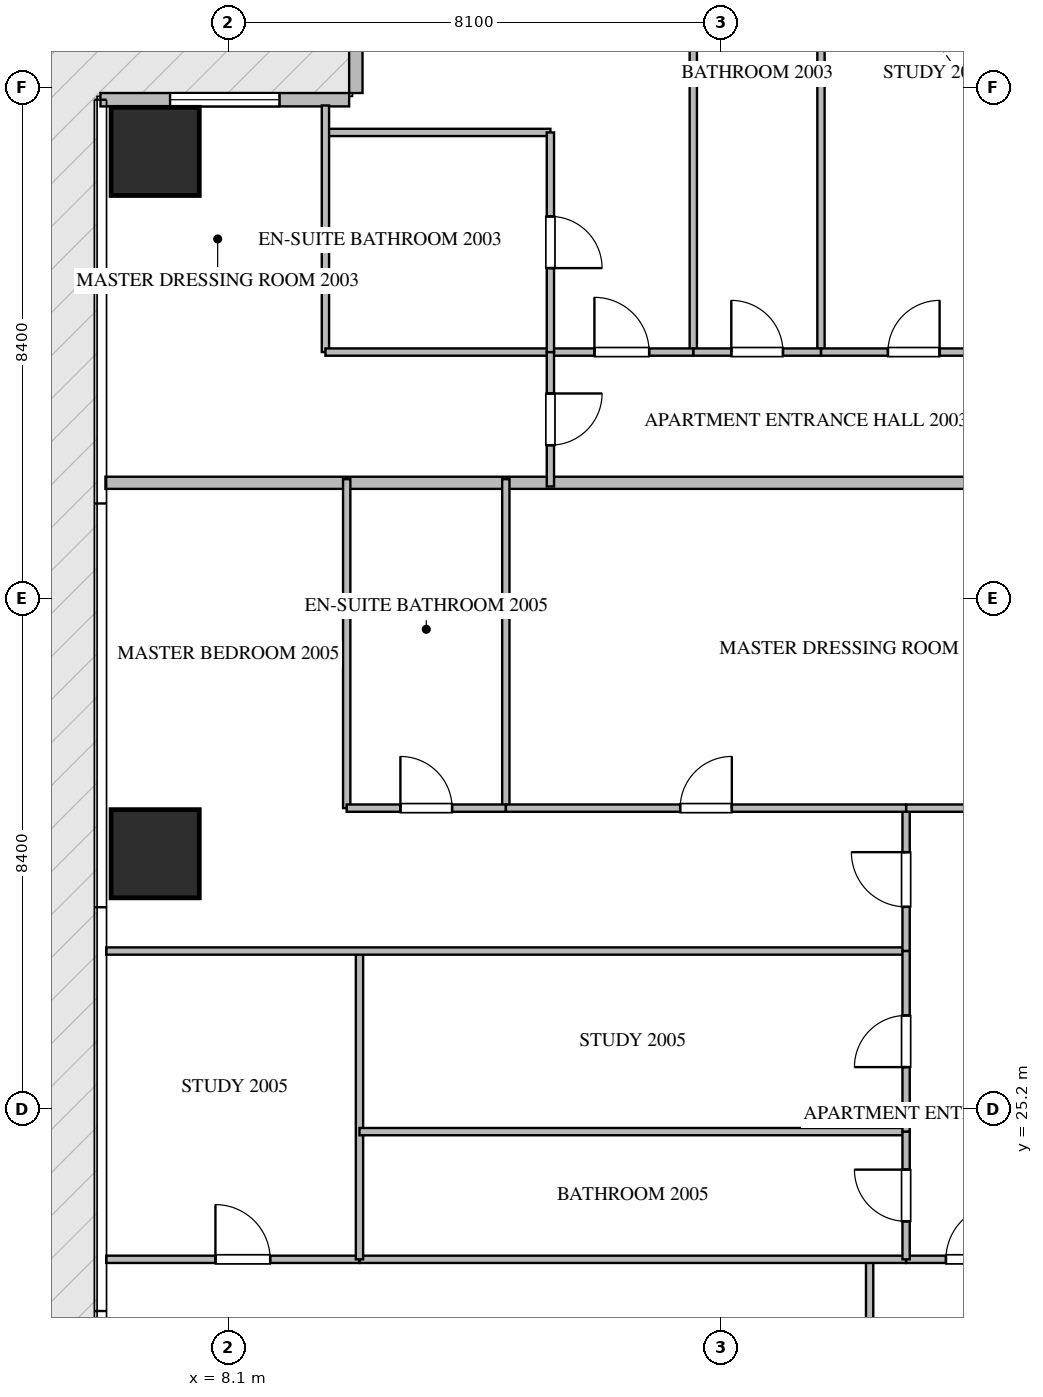
"""IFC4 building model, lengths in metres.
Left out: names, types, materials, properties, quantities, classifications, styles, units other than length and angle.
Written with IfcOpenShell. Run it as: python <this file> out.ifc"""

import sys

from ifc_helpers import new_model, si_unit, direction, frame, frame_2d, origin, origin_2d, place, context, subcontext, project, spatial, rectangle, extrude, source, transform, mapped, element, fill, save


model = new_model("IFC4")
c1 = context("Model", 3, precision=1e-05, world=origin(), true_north=direction((0.0, 1.0)))
c2 = subcontext(c1, "Body", "Model", "MODEL_VIEW")
j1 = project(units=[si_unit("LENGTHUNIT", "METRE"), si_unit("PLANEANGLEUNIT", "RADIAN")], contexts=[c1])
p1 = place(None, origin())
s1 = spatial("IfcSite", under=j1, at=p1, CompositionType="ELEMENT")
p2 = place(p1, origin())
s2 = spatial("IfcBuilding", under=s1, at=p2, CompositionType="ELEMENT")
p3 = place(p2, frame((0.0, 0.0, 82.95)))
s3 = spatial("IfcBuildingStorey", under=s2, at=p3, CompositionType="ELEMENT", Elevation=82.95)
m1 = source(origin(), c2, "Body", "SweptSolid", [
    extrude(rectangle(XDim=1.45, YDim=1.45, at=origin_2d()), origin(), (0.0, 0.0, 1.0), 3.75),
])
for number, where, z_axis, x_axis in (
    (1, (6.9, 29.4, -0.26), (0.0, 0.0, 1.0), (1.0, 0.0, 0.0)),
    (2, (6.9, 40.95, -0.26), (0.0, 0.0, 1.0), (1.0, 0.0, 0.0)),
):
    element("IfcColumn", number, at=place(p3, frame(where, z_axis=z_axis, x_axis=x_axis)), inside=s3, PredefinedType="COLUMN", context=c2, shape_type="MappedRepresentation", body=[
        mapped(m1, transform((0.0, 0.0, 0.0), scale=1.0)),
    ])
p4 = place(p3, frame((10.2, 45.89, 0.0), z_axis=(0.0, 0.0, 1.0), x_axis=(0.0, -1.0, 0.0)))
e3 = element("IfcWall", 3, at=p4, inside=s3, PredefinedType="ELEMENTEDWALL", context=c2, shape_type="SweptSolid", body=[
    extrude(rectangle(XDim=3.98, YDim=0.22, at=frame_2d((1.99, 0.0))), origin(), (0.0, 0.0, 1.0), 3.475),
])
p5 = place(p4, frame((1.09, 0.0, 0.65)))
e4 = element("IfcOpeningElement", 4, at=p5, cuts=e3, PredefinedType="OPENING", context=c2, shape_type="SweptSolid", body=[
    extrude(rectangle(XDim=1.8, YDim=2.1, at=frame_2d((0.9, 1.05))), frame((0.0, 0.12, 0.0), z_axis=(0.0, -1.0, 0.0), x_axis=(1.0, 0.0, 0.0)), (0.0, 0.0, 1.0), 0.24),
])
p6 = place(p3, frame((10.09, 41.8, 0.0), z_axis=(0.0, 0.0, 1.0), x_axis=(-1.0, 0.0, 0.0)))
e5 = element("IfcWall", 5, at=p6, inside=s3, PredefinedType="ELEMENTEDWALL", context=c2, shape_type="SweptSolid", body=[
    extrude(rectangle(XDim=4.09, YDim=0.22, at=frame_2d((2.045, 0.0))), origin(), (0.0, 0.0, 1.0), 3.475),
])
p7 = place(p6, frame((1.145, 0.0, 0.65)))
e6 = element("IfcOpeningElement", 6, at=p7, cuts=e5, PredefinedType="OPENING", context=c2, shape_type="SweptSolid", body=[
    extrude(rectangle(XDim=1.8, YDim=2.1, at=frame_2d((0.9, 1.05))), frame((0.0, 0.12, 0.0), z_axis=(0.0, -1.0, 0.0), x_axis=(1.0, 0.0, 0.0)), (0.0, 0.0, 1.0), 0.24),
])
p8 = place(p3, frame((6.082, 35.5, 0.0), z_axis=(0.0, 0.0, 1.0), x_axis=(1.0, 0.0, 0.0)))
e7 = element("IfcWall", 7, at=p8, inside=s3, PredefinedType="PARTITIONING", context=c2, shape_type="SweptSolid", body=[
    extrude(rectangle(XDim=15.318, YDim=0.2, at=frame_2d((7.659, 0.0))), origin(), (0.0, 0.0, 1.0), 3.49),
])
p9 = place(p3, frame((15.75, 50.105, 0.0), z_axis=(0.0, 0.0, 1.0), x_axis=(0.0, -1.0, 0.0)))
e8 = element("IfcWall", 8, at=p9, inside=s3, PredefinedType="PARTITIONING", context=c2, shape_type="SweptSolid", body=[
    extrude(rectangle(XDim=12.455, YDim=0.12, at=frame_2d((6.228, 0.0))), origin(), (0.0, 0.0, 1.0), 3.49),
])
p10 = place(p3, frame((17.85, 46.279, 0.0), z_axis=(0.0, 0.0, 1.0), x_axis=(0.0, -1.0, 0.0)))
e9 = element("IfcWall", 9, at=p10, inside=s3, PredefinedType="PARTITIONING", context=c2, shape_type="SweptSolid", body=[
    extrude(rectangle(XDim=8.629, YDim=0.12, at=frame_2d((4.314, 0.0))), origin(), (0.0, 0.0, 1.0), 3.49),
])
p11 = place(p3, frame((15.75, 37.65, 0.0), z_axis=(0.0, 0.0, 1.0), x_axis=(1.0, 0.0, 0.0)))
e10 = element("IfcWall", 10, at=p11, inside=s3, PredefinedType="PARTITIONING", context=c2, shape_type="SweptSolid", body=[
    extrude(rectangle(XDim=2.1, YDim=0.12, at=frame_2d((1.05, 0.0))), origin(), (0.0, 0.0, 1.0), 3.49),
])
p12 = place(p11, frame((0.625, 0.0, 0.0)))
e11 = element("IfcOpeningElement", 11, at=p12, cuts=e10, PredefinedType="OPENING", context=c2, shape_type="SweptSolid", body=[
    extrude(rectangle(XDim=0.85, YDim=2.1, at=frame_2d((0.425, 1.05))), frame((0.0, 0.07, 0.0), z_axis=(0.0, -1.0, 0.0), x_axis=(1.0, 0.0, 0.0)), (0.0, 0.0, 1.0), 0.14),
])
p13 = place(p3, frame((17.852, 37.65, 0.0), z_axis=(0.0, 0.0, 1.0), x_axis=(1.0, 0.0, 0.0)))
e12 = element("IfcWall", 12, at=p13, inside=s3, PredefinedType="PARTITIONING", context=c2, shape_type="SweptSolid", body=[
    extrude(rectangle(XDim=3.048, YDim=0.12, at=frame_2d((1.524, 0.0))), origin(), (0.0, 0.0, 1.0), 3.49),
])
p14 = place(p13, frame((1.099, 0.0, 0.0)))
e13 = element("IfcOpeningElement", 13, at=p14, cuts=e12, PredefinedType="OPENING", context=c2, shape_type="SweptSolid", body=[
    extrude(rectangle(XDim=0.85, YDim=2.1, at=frame_2d((0.425, 1.05))), frame((0.0, 0.07, 0.0), z_axis=(0.0, -1.0, 0.0), x_axis=(1.0, 0.0, 0.0)), (0.0, 0.0, 1.0), 0.14),
])
p15 = place(p3, frame((13.4, 37.65, 0.0), z_axis=(0.0, 0.0, 1.0), x_axis=(1.0, 0.0, 0.0)))
e14 = element("IfcWall", 14, at=p15, inside=s3, PredefinedType="PARTITIONING", context=c2, shape_type="SweptSolid", body=[
    extrude(rectangle(XDim=2.348, YDim=0.12, at=frame_2d((1.174, 0.0))), origin(), (0.0, 0.0, 1.0), 3.49),
])
p16 = place(p15, frame((0.724, 0.0, 0.0)))
e15 = element("IfcOpeningElement", 15, at=p16, cuts=e14, PredefinedType="OPENING", context=c2, shape_type="SweptSolid", body=[
    extrude(rectangle(XDim=0.9, YDim=2.1, at=frame_2d((0.45, 1.05))), frame((0.0, 0.07, 0.0), z_axis=(0.0, -1.0, 0.0), x_axis=(1.0, 0.0, 0.0)), (0.0, 0.0, 1.0), 0.14),
])
p17 = place(p3, frame((9.7, 41.262, 0.0), z_axis=(0.0, 0.0, 1.0), x_axis=(1.0, 0.0, 0.0)))
e16 = element("IfcWall", 16, at=p17, inside=s3, PredefinedType="PARTITIONING", context=c2, shape_type="SweptSolid", body=[
    extrude(rectangle(XDim=3.7, YDim=0.12, at=frame_2d((1.85, 0.0))), origin(), (0.0, 0.0, 1.0), 3.49),
])
p18 = place(p3, frame((9.7, 41.705, 0.0), z_axis=(0.0, 0.0, 1.0), x_axis=(0.0, -1.0, 0.0)))
e17 = element("IfcWall", 17, at=p18, inside=s3, PredefinedType="PARTITIONING", context=c2, shape_type="SweptSolid", body=[
    extrude(rectangle(XDim=4.055, YDim=0.12, at=frame_2d((2.028, 0.0))), origin(), (0.0, 0.0, 1.0), 3.49),
])
p19 = place(p3, frame((9.7, 37.65, 0.0), z_axis=(0.0, 0.0, 1.0), x_axis=(1.0, 0.0, 0.0)))
e18 = element("IfcWall", 18, at=p19, inside=s3, PredefinedType="PARTITIONING", context=c2, shape_type="SweptSolid", body=[
    extrude(rectangle(XDim=3.698, YDim=0.12, at=frame_2d((1.849, 0.0))), origin(), (0.0, 0.0, 1.0), 3.49),
])
p20 = place(p3, frame((13.4, 41.262, 0.0), z_axis=(0.0, 0.0, 1.0), x_axis=(0.0, -1.0, 0.0)))
e19 = element("IfcWall", 19, at=p20, inside=s3, PredefinedType="PARTITIONING", context=c2, shape_type="SweptSolid", body=[
    extrude(rectangle(XDim=3.612, YDim=0.12, at=frame_2d((1.806, 0.0))), origin(), (0.0, 0.0, 1.0), 3.49),
])
p21 = place(p20, frame((1.381, 0.0, 0.0)))
e20 = element("IfcOpeningElement", 20, at=p21, cuts=e19, PredefinedType="OPENING", context=c2, shape_type="SweptSolid", body=[
    extrude(rectangle(XDim=0.85, YDim=2.1, at=frame_2d((0.425, 1.05))), frame((0.0, 0.07, 0.0), z_axis=(0.0, -1.0, 0.0), x_axis=(1.0, 0.0, 0.0)), (0.0, 0.0, 1.0), 0.14),
])
p22 = place(p3, frame((13.4, 37.648, 0.0), z_axis=(0.0, 0.0, 1.0), x_axis=(0.0, -1.0, 0.0)))
e21 = element("IfcWall", 21, at=p22, inside=s3, PredefinedType="PARTITIONING", context=c2, shape_type="SweptSolid", body=[
    extrude(rectangle(XDim=2.208, YDim=0.12, at=frame_2d((1.104, 0.0))), origin(), (0.0, 0.0, 1.0), 3.49),
])
p23 = place(p22, frame((0.679, 0.0, 0.0)))
e22 = element("IfcOpeningElement", 22, at=p23, cuts=e21, PredefinedType="OPENING", context=c2, shape_type="SweptSolid", body=[
    extrude(rectangle(XDim=0.85, YDim=2.1, at=frame_2d((0.425, 1.05))), frame((0.0, 0.07, 0.0), z_axis=(0.0, -1.0, 0.0), x_axis=(1.0, 0.0, 0.0)), (0.0, 0.0, 1.0), 0.14),
])
p24 = place(p3, frame((18.65, 19.4, 0.0), z_axis=(0.0, 0.0, 1.0), x_axis=(0.0, 1.0, 0.0)))
e23 = element("IfcWall", 23, at=p24, inside=s3, PredefinedType="PARTITIONING", context=c2, shape_type="SweptSolid", body=[
    extrude(rectangle(XDim=3.33, YDim=0.12, at=frame_2d((1.665, 0.0))), origin(), (0.0, 0.0, 1.0), 3.49),
])
p25 = place(p24, frame((1.24, 0.0, 0.0)))
e24 = element("IfcOpeningElement", 24, at=p25, cuts=e23, PredefinedType="OPENING", context=c2, shape_type="SweptSolid", body=[
    extrude(rectangle(XDim=0.85, YDim=2.1, at=frame_2d((0.425, 1.05))), frame((0.0, 0.07, 0.0), z_axis=(0.0, -1.0, 0.0), x_axis=(1.0, 0.0, 0.0)), (0.0, 0.0, 1.0), 0.14),
])
p26 = place(p3, frame((19.25, 22.73, 0.0), z_axis=(0.0, 0.0, 1.0), x_axis=(1.0, 0.0, 0.0)))
e25 = element("IfcWall", 25, at=p26, inside=s3, PredefinedType="PARTITIONING", context=c2, shape_type="SweptSolid", body=[
    extrude(rectangle(XDim=2.21, YDim=0.12, at=frame_2d((1.105, 0.0))), origin(), (0.0, 0.0, 1.0), 3.49),
])
p27 = place(p26, frame((0.655, 0.0, 0.0)))
e26 = element("IfcOpeningElement", 26, at=p27, cuts=e25, PredefinedType="OPENING", context=c2, shape_type="SweptSolid", body=[
    extrude(rectangle(XDim=0.9, YDim=2.1, at=frame_2d((0.45, 1.05))), frame((0.0, 0.07, 0.0), z_axis=(0.0, -1.0, 0.0), x_axis=(1.0, 0.0, 0.0)), (0.0, 0.0, 1.0), 0.14),
])
p28 = place(p3, frame((6.095, 22.73, 0.0), z_axis=(0.0, 0.0, 1.0), x_axis=(1.0, 0.0, 0.0)))
e27 = element("IfcWall", 27, at=p28, inside=s3, PredefinedType="PARTITIONING", context=c2, shape_type="SweptSolid", body=[
    extrude(rectangle(XDim=4.165, YDim=0.12, at=frame_2d((2.083, 0.0))), origin(), (0.0, 0.0, 1.0), 3.49),
])
p29 = place(p28, frame((1.796, 0.0, 0.0)))
e28 = element("IfcOpeningElement", 28, at=p29, cuts=e27, PredefinedType="OPENING", context=c2, shape_type="SweptSolid", body=[
    extrude(rectangle(XDim=0.9, YDim=2.1, at=frame_2d((0.45, 1.05))), frame((0.0, 0.07, 0.0), z_axis=(0.0, -1.0, 0.0), x_axis=(1.0, 0.0, 0.0)), (0.0, 0.0, 1.0), 0.14),
])
p30 = place(p3, frame((10.262, 22.73, 0.0), z_axis=(0.0, 0.0, 1.0), x_axis=(1.0, 0.0, 0.0)))
e29 = element("IfcWall", 29, at=p30, inside=s3, PredefinedType="PARTITIONING", context=c2, shape_type="SweptSolid", body=[
    extrude(rectangle(XDim=8.986, YDim=0.12, at=frame_2d((4.493, 0.0))), origin(), (0.0, 0.0, 1.0), 3.49),
])
p31 = place(p3, frame((10.26, 22.73, 0.0), z_axis=(0.0, 0.0, 1.0), x_axis=(0.0, 1.0, 0.0)))
e30 = element("IfcWall", 30, at=p31, inside=s3, PredefinedType="PARTITIONING", context=c2, shape_type="SweptSolid", body=[
    extrude(rectangle(XDim=5.07, YDim=0.12, at=frame_2d((2.535, 0.0))), origin(), (0.0, 0.0, 1.0), 3.49),
])
p32 = place(p3, frame((6.095, 27.8, 0.0), z_axis=(0.0, 0.0, 1.0), x_axis=(1.0, 0.0, 0.0)))
e31 = element("IfcWall", 31, at=p32, inside=s3, PredefinedType="PARTITIONING", context=c2, shape_type="SweptSolid", body=[
    extrude(rectangle(XDim=13.155, YDim=0.12, at=frame_2d((6.578, 0.0))), origin(), (0.0, 0.0, 1.0), 3.49),
])
p33 = place(p3, frame((10.26, 24.83, 0.0), z_axis=(0.0, 0.0, 1.0), x_axis=(1.0, 0.0, 0.0)))
e32 = element("IfcWall", 32, at=p33, inside=s3, PredefinedType="PARTITIONING", context=c2, shape_type="SweptSolid", body=[
    extrude(rectangle(XDim=8.99, YDim=0.12, at=frame_2d((4.495, 0.0))), origin(), (0.0, 0.0, 1.0), 3.49),
])
p34 = place(p3, frame((19.25, 22.73, 0.0), z_axis=(0.0, 0.0, 1.0), x_axis=(0.0, 1.0, 0.0)))
e33 = element("IfcWall", 33, at=p34, inside=s3, PredefinedType="PARTITIONING", context=c2, shape_type="SweptSolid", body=[
    extrude(rectangle(XDim=2.1, YDim=0.12, at=frame_2d((1.05, 0.0))), origin(), (0.0, 0.0, 1.0), 3.49),
])
p35 = place(p34, frame((0.625, 0.0, 0.0)))
e34 = element("IfcOpeningElement", 34, at=p35, cuts=e33, PredefinedType="OPENING", context=c2, shape_type="SweptSolid", body=[
    extrude(rectangle(XDim=0.85, YDim=2.1, at=frame_2d((0.425, 1.05))), frame((0.0, 0.07, 0.0), z_axis=(0.0, -1.0, 0.0), x_axis=(1.0, 0.0, 0.0)), (0.0, 0.0, 1.0), 0.14),
])
p36 = place(p3, frame((19.25, 24.832, 0.0), z_axis=(0.0, 0.0, 1.0), x_axis=(0.0, 1.0, 0.0)))
e35 = element("IfcWall", 35, at=p36, inside=s3, PredefinedType="PARTITIONING", context=c2, shape_type="SweptSolid", body=[
    extrude(rectangle(XDim=2.968, YDim=0.12, at=frame_2d((1.484, 0.0))), origin(), (0.0, 0.0, 1.0), 3.49),
])
p37 = place(p36, frame((1.059, 0.0, 0.0)))
e36 = element("IfcOpeningElement", 36, at=p37, cuts=e35, PredefinedType="OPENING", context=c2, shape_type="SweptSolid", body=[
    extrude(rectangle(XDim=0.85, YDim=2.1, at=frame_2d((0.425, 1.05))), frame((0.0, 0.07, 0.0), z_axis=(0.0, -1.0, 0.0), x_axis=(1.0, 0.0, 0.0)), (0.0, 0.0, 1.0), 0.14),
])
p38 = place(p3, frame((19.25, 27.802, 0.0), z_axis=(0.0, 0.0, 1.0), x_axis=(0.0, 1.0, 0.0)))
e37 = element("IfcWall", 37, at=p38, inside=s3, PredefinedType="PARTITIONING", context=c2, shape_type="SweptSolid", body=[
    extrude(rectangle(XDim=2.348, YDim=0.12, at=frame_2d((1.174, 0.0))), origin(), (0.0, 0.0, 1.0), 3.49),
])
p39 = place(p38, frame((0.724, 0.0, 0.0)))
e38 = element("IfcOpeningElement", 38, at=p39, cuts=e37, PredefinedType="OPENING", context=c2, shape_type="SweptSolid", body=[
    extrude(rectangle(XDim=0.9, YDim=2.1, at=frame_2d((0.45, 1.05))), frame((0.0, 0.07, 0.0), z_axis=(0.0, -1.0, 0.0), x_axis=(1.0, 0.0, 0.0)), (0.0, 0.0, 1.0), 0.14),
])
for number, where, z_axis, x_axis in (
    (39, (10.05, 30.15, 0.0), (0.0, 0.0, 1.0), (0.0, 1.0, 0.0)),
    (40, (12.667, 30.15, 0.0), (0.0, 0.0, 1.0), (0.0, 1.0, 0.0)),
):
    element("IfcWall", number, at=place(p3, frame(where, z_axis=z_axis, x_axis=x_axis)), inside=s3, PredefinedType="PARTITIONING", context=c2, shape_type="SweptSolid", body=[
        extrude(rectangle(XDim=5.41, YDim=0.12, at=frame_2d((2.705, 0.0))), origin(), (0.0, 0.0, 1.0), 3.49),
    ])
p40 = place(p3, frame((10.05, 30.15, 0.0), z_axis=(0.0, 0.0, 1.0), x_axis=(1.0, 0.0, 0.0)))
e41 = element("IfcWall", 41, at=p40, inside=s3, PredefinedType="PARTITIONING", context=c2, shape_type="SweptSolid", body=[
    extrude(rectangle(XDim=2.617, YDim=0.12, at=frame_2d((1.309, 0.0))), origin(), (0.0, 0.0, 1.0), 3.49),
])
p41 = place(p40, frame((0.883, 0.0, 0.0)))
e42 = element("IfcOpeningElement", 42, at=p41, cuts=e41, PredefinedType="OPENING", context=c2, shape_type="SweptSolid", body=[
    extrude(rectangle(XDim=0.85, YDim=2.1, at=frame_2d((0.425, 1.05))), frame((0.0, 0.07, 0.0), z_axis=(0.0, -1.0, 0.0), x_axis=(1.0, 0.0, 0.0)), (0.0, 0.0, 1.0), 0.14),
])
p42 = place(p3, frame((12.669, 30.15, 0.0), z_axis=(0.0, 0.0, 1.0), x_axis=(1.0, 0.0, 0.0)))
e43 = element("IfcWall", 43, at=p42, inside=s3, PredefinedType="PARTITIONING", context=c2, shape_type="SweptSolid", body=[
    extrude(rectangle(XDim=6.581, YDim=0.12, at=frame_2d((3.291, 0.0))), origin(), (0.0, 0.0, 1.0), 3.49),
])
p43 = place(p42, frame((2.865, 0.0, 0.0)))
e44 = element("IfcOpeningElement", 44, at=p43, cuts=e43, PredefinedType="OPENING", context=c2, shape_type="SweptSolid", body=[
    extrude(rectangle(XDim=0.85, YDim=2.1, at=frame_2d((0.425, 1.05))), frame((0.0, 0.07, 0.0), z_axis=(0.0, -1.0, 0.0), x_axis=(1.0, 0.0, 0.0)), (0.0, 0.0, 1.0), 0.14),
])
p44 = place(p3, frame((19.252, 30.15, 0.0), z_axis=(0.0, 0.0, 1.0), x_axis=(1.0, 0.0, 0.0)))
e45 = element("IfcWall", 45, at=p44, inside=s3, PredefinedType="PARTITIONING", context=c2, shape_type="SweptSolid", body=[
    extrude(rectangle(XDim=2.208, YDim=0.12, at=frame_2d((1.104, 0.0))), origin(), (0.0, 0.0, 1.0), 3.49),
])
m2 = source(origin(), c2, "Body", "SweptSolid", [
    extrude(rectangle(XDim=1.8, YDim=2.1, at=frame_2d((0.9, 1.05))), frame((0.0, 0.03, 0.0), z_axis=(0.0, -1.0, 0.0), x_axis=(1.0, 0.0, 0.0)), (0.0, 0.0, 1.0), 0.06),
])
p45 = place(p7, origin())
e46 = element("IfcWindow", 46, at=p45, inside=s3, PartitioningType="SINGLE_PANEL", PredefinedType="WINDOW", context=c2, shape_type="MappedRepresentation", body=[
    mapped(m2, transform((0.0, 0.0, 0.0), scale=1.0)),
])
fill(e6, e46)
m3 = source(origin(), c2, "Body", "SweptSolid", [
    extrude(rectangle(XDim=0.85, YDim=2.1, at=frame_2d((0.425, 1.05))), frame((0.0, 0.025, 0.0), z_axis=(0.0, -1.0, 0.0), x_axis=(1.0, 0.0, 0.0)), (0.0, 0.0, 1.0), 0.05),
])
p46 = place(p12, origin())
e47 = element("IfcDoor", 47, at=p46, inside=s3, OperationType="SINGLE_SWING_LEFT", PredefinedType="DOOR", context=c2, shape_type="MappedRepresentation", body=[
    mapped(m3, transform((0.0, 0.0, 0.0), scale=1.0)),
])
fill(e11, e47)
p47 = place(p14, origin())
e48 = element("IfcDoor", 48, at=p47, inside=s3, OperationType="SINGLE_SWING_RIGHT", PredefinedType="DOOR", context=c2, shape_type="MappedRepresentation", body=[
    mapped(m3, transform((0.0, 0.0, 0.0), scale=1.0)),
])
fill(e13, e48)
m4 = source(origin(), c2, "Body", "SweptSolid", [
    extrude(rectangle(XDim=0.9, YDim=2.1, at=frame_2d((0.45, 1.05))), frame((0.0, 0.025, 0.0), z_axis=(0.0, -1.0, 0.0), x_axis=(1.0, 0.0, 0.0)), (0.0, 0.0, 1.0), 0.05),
])
p48 = place(p16, origin())
e49 = element("IfcDoor", 49, at=p48, inside=s3, OperationType="SINGLE_SWING_LEFT", PredefinedType="DOOR", context=c2, shape_type="MappedRepresentation", body=[
    mapped(m4, transform((0.0, 0.0, 0.0), scale=1.0)),
])
fill(e15, e49)
p49 = place(p21, origin())
e50 = element("IfcDoor", 50, at=p49, inside=s3, OperationType="SINGLE_SWING_RIGHT", PredefinedType="DOOR", context=c2, shape_type="MappedRepresentation", body=[
    mapped(m3, transform((0.0, 0.0, 0.0), scale=1.0)),
])
fill(e20, e50)
p50 = place(p23, origin())
e51 = element("IfcDoor", 51, at=p50, inside=s3, OperationType="SINGLE_SWING_LEFT", PredefinedType="DOOR", context=c2, shape_type="MappedRepresentation", body=[
    mapped(m3, transform((0.0, 0.0, 0.0), scale=1.0)),
])
fill(e22, e51)
p51 = place(p27, origin())
e52 = element("IfcDoor", 52, at=p51, inside=s3, OperationType="SINGLE_SWING_RIGHT", PredefinedType="DOOR", context=c2, shape_type="MappedRepresentation", body=[
    mapped(m4, transform((0.0, 0.0, 0.0), scale=1.0)),
])
fill(e26, e52)
p52 = place(p29, origin())
e53 = element("IfcDoor", 53, at=p52, inside=s3, OperationType="SINGLE_SWING_LEFT", PredefinedType="DOOR", context=c2, shape_type="MappedRepresentation", body=[
    mapped(m4, transform((0.0, 0.0, 0.0), scale=1.0)),
])
fill(e28, e53)
p53 = place(p35, origin())
e54 = element("IfcDoor", 54, at=p53, inside=s3, OperationType="SINGLE_SWING_RIGHT", PredefinedType="DOOR", context=c2, shape_type="MappedRepresentation", body=[
    mapped(m3, transform((0.0, 0.0, 0.0), scale=1.0)),
])
fill(e34, e54)
p54 = place(p37, origin())
e55 = element("IfcDoor", 55, at=p54, inside=s3, OperationType="SINGLE_SWING_LEFT", PredefinedType="DOOR", context=c2, shape_type="MappedRepresentation", body=[
    mapped(m3, transform((0.0, 0.0, 0.0), scale=1.0)),
])
fill(e36, e55)
p55 = place(p39, origin())
e56 = element("IfcDoor", 56, at=p55, inside=s3, OperationType="SINGLE_SWING_RIGHT", PredefinedType="DOOR", context=c2, shape_type="MappedRepresentation", body=[
    mapped(m4, transform((0.0, 0.0, 0.0), scale=1.0)),
])
fill(e38, e56)
p56 = place(p41, origin())
e57 = element("IfcDoor", 57, at=p56, inside=s3, OperationType="SINGLE_SWING_LEFT", PredefinedType="DOOR", context=c2, shape_type="MappedRepresentation", body=[
    mapped(m3, transform((0.0, 0.0, 0.0), scale=1.0)),
])
fill(e42, e57)
p57 = place(p43, origin())
e58 = element("IfcDoor", 58, at=p57, inside=s3, OperationType="SINGLE_SWING_RIGHT", PredefinedType="DOOR", context=c2, shape_type="MappedRepresentation", body=[
    mapped(m3, transform((0.0, 0.0, 0.0), scale=1.0)),
])
fill(e44, e58)
save(model, sys.argv[1])
